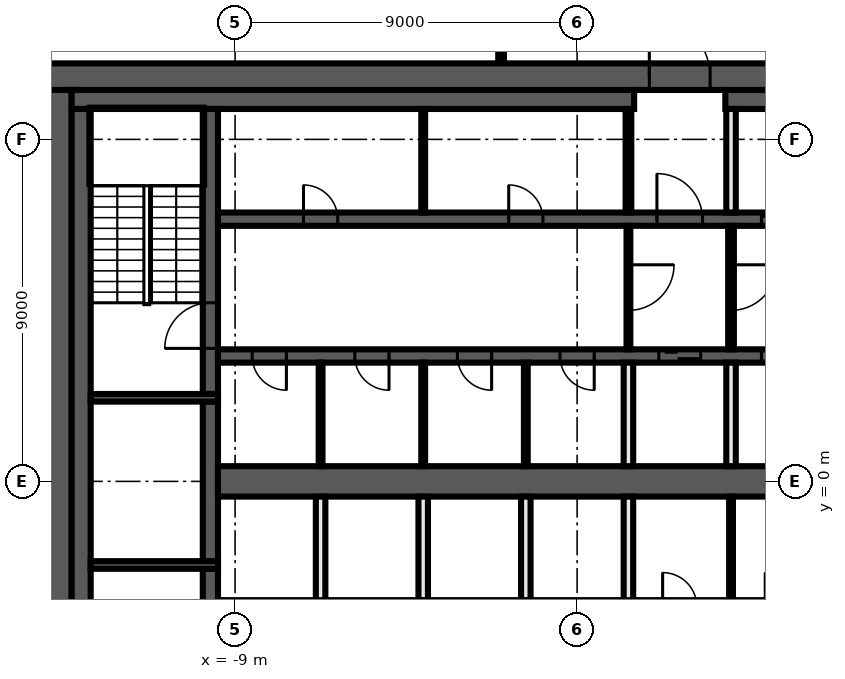
"""IFC4 building model, lengths in metres.
Left out: names, types, materials, properties, quantities, classifications, styles, units other than length and angle.
Written with IfcOpenShell. Run it as: python <this file> out.ifc"""

import sys

from ifc_helpers import new_model, si_unit, direction, frame, frame_2d, origin, place, context, subcontext, project, spatial, rectangle, extrude, element, fill, save


model = new_model("IFC4")
c1 = context("Model", 3, precision=1e-05, world=origin(), true_north=direction((0.0, 1.0)))
c2 = subcontext(c1, "Body", "Model", "MODEL_VIEW")
j1 = project(units=[si_unit("LENGTHUNIT", "METRE"), si_unit("PLANEANGLEUNIT", "RADIAN")], contexts=[c1])
p1 = place(None, origin())
s1 = spatial("IfcSite", under=j1, at=p1, CompositionType="ELEMENT")
p2 = place(p1, origin())
s2 = spatial("IfcBuilding", under=s1, at=p2, CompositionType="ELEMENT")
p3 = place(p2, frame((0.0, 0.0, 232.8)))
s3 = spatial("IfcBuildingStorey", under=s2, at=p3, CompositionType="ELEMENT", Elevation=232.8)
p4 = place(p3, frame((-2.0, 11.0, 0.0), z_axis=(0.0, 0.0, 1.0), x_axis=(0.0, 1.0, 0.0)))
e1 = element("IfcWall", 1, at=p4, inside=s3, PredefinedType="PARTITIONING", context=c2, shape_type="SweptSolid", body=[
    extrude(rectangle(XDim=2.325, YDim=0.15, at=frame_2d((1.163, 0.0))), origin(), (0.0, 0.0, 1.0), 3.75),
])
p5 = place(p3, frame((-14.0, 10.65, 0.0), z_axis=(0.0, 0.0, 1.0), x_axis=(1.0, 0.0, 0.0)))
e2 = element("IfcWall", 2, at=p5, inside=s3, PredefinedType="SHEAR", context=c2, shape_type="SweptSolid", body=[
    extrude(rectangle(XDim=28.0, YDim=0.7, at=frame_2d((14.0, 0.0))), origin(), (0.0, 0.0, 1.0), 3.75),
])
p6 = place(p5, frame((15.9, 0.0, 0.0)))
e3 = element("IfcOpeningElement", 3, at=p6, cuts=e2, PredefinedType="OPENING", context=c2, shape_type="SweptSolid", body=[
    extrude(rectangle(XDim=1.6, YDim=2.1, at=frame_2d((0.8, 1.05))), frame((0.0, 0.36, 0.0), z_axis=(0.0, -1.0, 0.0), x_axis=(1.0, 0.0, 0.0)), (0.0, 0.0, 1.0), 0.72),
])
p7 = place(p3, frame((-13.65, -10.3, 0.0), z_axis=(0.0, 0.0, 1.0), x_axis=(0.0, 1.0, 0.0)))
e4 = element("IfcWall", 4, at=p7, inside=s3, PredefinedType="SHEAR", context=c2, shape_type="SweptSolid", body=[
    extrude(rectangle(XDim=20.6, YDim=0.7, at=frame_2d((10.3, 0.0))), origin(), (0.0, 0.0, 1.0), 3.75),
])
p8 = place(p3, frame((-13.3, 10.05, 0.0), z_axis=(0.0, 0.0, 1.0), x_axis=(1.0, 0.0, 0.0)))
e5 = element("IfcWall", 5, at=p8, inside=s3, PredefinedType="SHEAR", context=c2, shape_type="SweptSolid", body=[
    extrude(rectangle(XDim=14.8, YDim=0.5, at=frame_2d((7.4, 0.0))), origin(), (0.0, 0.0, 1.0), 3.75),
])
p9 = place(p3, frame((3.9, 10.05, 0.0), z_axis=(0.0, 0.0, 1.0), x_axis=(1.0, 0.0, 0.0)))
e6 = element("IfcWall", 6, at=p9, inside=s3, PredefinedType="SHEAR", context=c2, shape_type="SweptSolid", body=[
    extrude(rectangle(XDim=9.4, YDim=0.5, at=frame_2d((4.7, 0.0))), origin(), (0.0, 0.0, 1.0), 3.75),
])
p10 = place(p3, frame((-13.05, -9.8, 0.0), z_axis=(0.0, 0.0, 1.0), x_axis=(0.0, 1.0, 0.0)))
e7 = element("IfcWall", 7, at=p10, inside=s3, PredefinedType="SHEAR", context=c2, shape_type="SweptSolid", body=[
    extrude(rectangle(XDim=19.6, YDim=0.5, at=frame_2d((9.8, 0.0))), origin(), (0.0, 0.0, 1.0), 3.75),
])
p11 = place(p3, frame((-9.65, -9.8, 0.0), z_axis=(0.0, 0.0, 1.0), x_axis=(0.0, 1.0, 0.0)))
e8 = element("IfcWall", 8, at=p11, inside=s3, PredefinedType="SHEAR", context=c2, shape_type="SweptSolid", body=[
    extrude(rectangle(XDim=7.5, YDim=0.4, at=frame_2d((3.75, 0.0))), origin(), (0.0, 0.0, 1.0), 3.75),
])
p12 = place(p11, frame((5.1, 0.0, 0.0)))
e9 = element("IfcOpeningElement", 9, at=p12, cuts=e8, PredefinedType="OPENING", context=c2, shape_type="SweptSolid", body=[
    extrude(rectangle(XDim=1.2, YDim=2.1, at=frame_2d((0.6, 1.05))), frame((0.0, 0.21, 0.0), z_axis=(0.0, -1.0, 0.0), x_axis=(1.0, 0.0, 0.0)), (0.0, 0.0, 1.0), 0.42),
])
p13 = place(p3, frame((-9.65, -2.1, 0.0), z_axis=(0.0, 0.0, 1.0), x_axis=(0.0, 1.0, 0.0)))
e10 = element("IfcWall", 10, at=p13, inside=s3, PredefinedType="SHEAR", context=c2, shape_type="SweptSolid", body=[
    extrude(rectangle(XDim=4.2, YDim=0.4, at=frame_2d((2.1, 0.0))), origin(), (0.0, 0.0, 1.0), 3.75),
])
p14 = place(p3, frame((-9.65, 2.3, 0.0), z_axis=(0.0, 0.0, 1.0), x_axis=(0.0, 1.0, 0.0)))
e11 = element("IfcWall", 11, at=p14, inside=s3, PredefinedType="SHEAR", context=c2, shape_type="SweptSolid", body=[
    extrude(rectangle(XDim=7.5, YDim=0.4, at=frame_2d((3.75, 0.0))), origin(), (0.0, 0.0, 1.0), 3.75),
])
p15 = place(p14, frame((1.2, 0.0, 0.0)))
e12 = element("IfcOpeningElement", 12, at=p15, cuts=e11, PredefinedType="OPENING", context=c2, shape_type="SweptSolid", body=[
    extrude(rectangle(XDim=1.2, YDim=2.1, at=frame_2d((0.6, 1.05))), frame((0.0, 0.21, 0.0), z_axis=(0.0, -1.0, 0.0), x_axis=(1.0, 0.0, 0.0)), (0.0, 0.0, 1.0), 0.42),
])
for number, where, z_axis, x_axis in (
    (13, (-9.45, 2.2, 0.0), (0.0, 0.0, 1.0), (-1.0, 0.0, 0.0)),
    (14, (-9.45, -2.2, 0.0), (0.0, 0.0, 1.0), (-1.0, 0.0, 0.0)),
):
    element("IfcWall", number, at=place(p3, frame(where, z_axis=z_axis, x_axis=x_axis)), inside=s3, PredefinedType="SHEAR", context=c2, shape_type="SweptSolid", body=[
        extrude(rectangle(XDim=3.35, YDim=0.2, at=frame_2d((1.675, 0.0))), origin(), (0.0, 0.0, 1.0), 3.75),
    ])
p16 = place(p3, frame((-9.45, 6.9, 0.0), z_axis=(0.0, 0.0, 1.0), x_axis=(1.0, 0.0, 0.0)))
e15 = element("IfcWall", 15, at=p16, inside=s3, PredefinedType="SHEAR", context=c2, shape_type="SweptSolid", body=[
    extrude(rectangle(XDim=18.9, YDim=0.35, at=frame_2d((9.45, 0.0))), origin(), (0.0, 0.0, 1.0), 3.75),
])
p17 = place(p16, frame((11.55, 0.0, 0.0)))
e16 = element("IfcOpeningElement", 16, at=p17, cuts=e15, PredefinedType="OPENING", context=c2, shape_type="SweptSolid", body=[
    extrude(rectangle(XDim=1.2, YDim=2.1, at=frame_2d((0.6, 1.05))), frame((0.0, 0.185, 0.0), z_axis=(0.0, -1.0, 0.0), x_axis=(1.0, 0.0, 0.0)), (0.0, 0.0, 1.0), 0.37),
])
p18 = place(p16, frame((14.3, 0.0, 0.0)))
e17 = element("IfcOpeningElement", 17, at=p18, cuts=e15, PredefinedType="OPENING", context=c2, shape_type="SweptSolid", body=[
    extrude(rectangle(XDim=1.1, YDim=2.1, at=frame_2d((0.55, 1.05))), frame((0.0, 0.185, 0.0), z_axis=(0.0, -1.0, 0.0), x_axis=(1.0, 0.0, 0.0)), (0.0, 0.0, 1.0), 0.37),
])
p19 = place(p16, frame((17.0, 0.0, 0.0)))
e18 = element("IfcOpeningElement", 18, at=p19, cuts=e15, PredefinedType="OPENING", context=c2, shape_type="SweptSolid", body=[
    extrude(rectangle(XDim=1.1, YDim=2.1, at=frame_2d((0.55, 1.05))), frame((0.0, 0.185, 0.0), z_axis=(0.0, -1.0, 0.0), x_axis=(1.0, 0.0, 0.0)), (0.0, 0.0, 1.0), 0.37),
])
p20 = place(p16, frame((2.25, 0.0, 0.0)))
e19 = element("IfcOpeningElement", 19, at=p20, cuts=e15, PredefinedType="OPENING", context=c2, shape_type="SweptSolid", body=[
    extrude(rectangle(XDim=0.9, YDim=2.1, at=frame_2d((0.45, 1.05))), frame((0.0, 0.185, 0.0), z_axis=(0.0, -1.0, 0.0), x_axis=(1.0, 0.0, 0.0)), (0.0, 0.0, 1.0), 0.37),
])
p21 = place(p16, frame((7.65, 0.0, 0.0)))
e20 = element("IfcOpeningElement", 20, at=p21, cuts=e15, PredefinedType="OPENING", context=c2, shape_type="SweptSolid", body=[
    extrude(rectangle(XDim=0.9, YDim=2.1, at=frame_2d((0.45, 1.05))), frame((0.0, 0.185, 0.0), z_axis=(0.0, -1.0, 0.0), x_axis=(1.0, 0.0, 0.0)), (0.0, 0.0, 1.0), 0.37),
])
p22 = place(p3, frame((9.45, 3.3, 0.0), z_axis=(0.0, 0.0, 1.0), x_axis=(-1.0, 0.0, 0.0)))
e21 = element("IfcWall", 21, at=p22, inside=s3, PredefinedType="SHEAR", context=c2, shape_type="SweptSolid", body=[
    extrude(rectangle(XDim=18.9, YDim=0.35, at=frame_2d((9.45, 0.0))), origin(), (0.0, 0.0, 1.0), 3.75),
])
p23 = place(p22, frame((6.2, 0.0, 0.0)))
e22 = element("IfcOpeningElement", 22, at=p23, cuts=e21, PredefinedType="OPENING", context=c2, shape_type="SweptSolid", body=[
    extrude(rectangle(XDim=1.1, YDim=2.1, at=frame_2d((0.55, 1.05))), frame((0.0, 0.185, 0.0), z_axis=(0.0, -1.0, 0.0), x_axis=(1.0, 0.0, 0.0)), (0.0, 0.0, 1.0), 0.37),
])
p24 = place(p22, frame((3.5, 0.0, 0.0)))
e23 = element("IfcOpeningElement", 23, at=p24, cuts=e21, PredefinedType="OPENING", context=c2, shape_type="SweptSolid", body=[
    extrude(rectangle(XDim=1.1, YDim=2.1, at=frame_2d((0.55, 1.05))), frame((0.0, 0.185, 0.0), z_axis=(0.0, -1.0, 0.0), x_axis=(1.0, 0.0, 0.0)), (0.0, 0.0, 1.0), 0.37),
])
p25 = place(p22, frame((0.9, 0.0, 0.0)))
e24 = element("IfcOpeningElement", 24, at=p25, cuts=e21, PredefinedType="OPENING", context=c2, shape_type="SweptSolid", body=[
    extrude(rectangle(XDim=0.9, YDim=2.1, at=frame_2d((0.45, 1.05))), frame((0.0, 0.185, 0.0), z_axis=(0.0, -1.0, 0.0), x_axis=(1.0, 0.0, 0.0)), (0.0, 0.0, 1.0), 0.37),
])
p26 = place(p22, frame((17.1, 0.0, 0.0)))
e25 = element("IfcOpeningElement", 25, at=p26, cuts=e21, PredefinedType="OPENING", context=c2, shape_type="SweptSolid", body=[
    extrude(rectangle(XDim=0.9, YDim=2.1, at=frame_2d((0.45, 1.05))), frame((0.0, 0.185, 0.0), z_axis=(0.0, -1.0, 0.0), x_axis=(1.0, 0.0, 0.0)), (0.0, 0.0, 1.0), 0.37),
])
p27 = place(p22, frame((14.4, 0.0, 0.0)))
e26 = element("IfcOpeningElement", 26, at=p27, cuts=e21, PredefinedType="OPENING", context=c2, shape_type="SweptSolid", body=[
    extrude(rectangle(XDim=0.9, YDim=2.1, at=frame_2d((0.45, 1.05))), frame((0.0, 0.185, 0.0), z_axis=(0.0, -1.0, 0.0), x_axis=(1.0, 0.0, 0.0)), (0.0, 0.0, 1.0), 0.37),
])
p28 = place(p22, frame((11.7, 0.0, 0.0)))
e27 = element("IfcOpeningElement", 27, at=p28, cuts=e21, PredefinedType="OPENING", context=c2, shape_type="SweptSolid", body=[
    extrude(rectangle(XDim=0.9, YDim=2.1, at=frame_2d((0.45, 1.05))), frame((0.0, 0.185, 0.0), z_axis=(0.0, -1.0, 0.0), x_axis=(1.0, 0.0, 0.0)), (0.0, 0.0, 1.0), 0.37),
])
p29 = place(p22, frame((9.0, 0.0, 0.0)))
e28 = element("IfcOpeningElement", 28, at=p29, cuts=e21, PredefinedType="OPENING", context=c2, shape_type="SweptSolid", body=[
    extrude(rectangle(XDim=0.9, YDim=2.1, at=frame_2d((0.45, 1.05))), frame((0.0, 0.185, 0.0), z_axis=(0.0, -1.0, 0.0), x_axis=(1.0, 0.0, 0.0)), (0.0, 0.0, 1.0), 0.37),
])
p30 = place(p3, frame((-9.45, 0.0, 0.0), z_axis=(0.0, 0.0, 1.0), x_axis=(1.0, 0.0, 0.0)))
e29 = element("IfcWall", 29, at=p30, inside=s3, PredefinedType="SHEAR", context=c2, shape_type="SweptSolid", body=[
    extrude(rectangle(XDim=18.9, YDim=0.8, at=frame_2d((9.45, 0.0))), origin(), (0.0, 0.0, 1.0), 3.75),
])
p31 = place(p3, frame((4.05, 6.725, 0.0), z_axis=(0.0, 0.0, 1.0), x_axis=(0.0, -1.0, 0.0)))
e30 = element("IfcWall", 30, at=p31, inside=s3, PredefinedType="PARTITIONING", context=c2, shape_type="SweptSolid", body=[
    extrude(rectangle(XDim=3.25, YDim=0.15, at=frame_2d((1.625, 0.0))), origin(), (0.0, 0.0, 1.0), 3.75),
])
p32 = place(p31, frame((1.025, 0.0, 0.0)))
e31 = element("IfcOpeningElement", 31, at=p32, cuts=e30, PredefinedType="OPENING", context=c2, shape_type="SweptSolid", body=[
    extrude(rectangle(XDim=1.2, YDim=2.1, at=frame_2d((0.6, 1.05))), frame((0.0, 0.085, 0.0), z_axis=(0.0, -1.0, 0.0), x_axis=(1.0, 0.0, 0.0)), (0.0, 0.0, 1.0), 0.17),
])
p33 = place(p3, frame((4.05, -3.125, 0.0), z_axis=(0.0, 0.0, 1.0), x_axis=(0.0, 1.0, 0.0)))
e32 = element("IfcWall", 32, at=p33, inside=s3, PredefinedType="PARTITIONING", context=c2, shape_type="SweptSolid", body=[
    extrude(rectangle(XDim=2.725, YDim=0.1, at=frame_2d((1.363, 0.0))), origin(), (0.0, 0.0, 1.0), 3.75),
])
for number, where, z_axis, x_axis in (
    (33, (4.05, 0.4, 0.0), (0.0, 0.0, 1.0), (0.0, 1.0, 0.0)),
    (34, (4.05, 7.075, 0.0), (0.0, 0.0, 1.0), (0.0, 1.0, 0.0)),
):
    element("IfcWall", number, at=place(p3, frame(where, z_axis=z_axis, x_axis=x_axis)), inside=s3, PredefinedType="SOLIDWALL", context=c2, shape_type="SweptSolid", body=[
        extrude(rectangle(XDim=2.725, YDim=0.25, at=frame_2d((1.363, 0.0))), origin(), (0.0, 0.0, 1.0), 3.75),
    ])
p34 = place(p3, frame((1.35, 7.075, 0.0), z_axis=(0.0, 0.0, 1.0), x_axis=(0.0, 1.0, 0.0)))
e35 = element("IfcWall", 35, at=p34, inside=s3, PredefinedType="PARTITIONING", context=c2, shape_type="SweptSolid", body=[
    extrude(rectangle(XDim=2.725, YDim=0.15, at=frame_2d((1.363, 0.0))), origin(), (0.0, 0.0, 1.0), 3.75),
])
p35 = place(p3, frame((1.35, 6.725, 0.0), z_axis=(0.0, 0.0, 1.0), x_axis=(0.0, -1.0, 0.0)))
e36 = element("IfcWall", 36, at=p35, inside=s3, PredefinedType="PARTITIONING", context=c2, shape_type="SweptSolid", body=[
    extrude(rectangle(XDim=3.25, YDim=0.1, at=frame_2d((1.625, 0.0))), origin(), (0.0, 0.0, 1.0), 3.75),
])
p36 = place(p35, frame((1.025, 0.0, 0.0)))
e37 = element("IfcOpeningElement", 37, at=p36, cuts=e36, PredefinedType="OPENING", context=c2, shape_type="SweptSolid", body=[
    extrude(rectangle(XDim=1.2, YDim=2.1, at=frame_2d((0.6, 1.05))), frame((0.0, 0.06, 0.0), z_axis=(0.0, -1.0, 0.0), x_axis=(1.0, 0.0, 0.0)), (0.0, 0.0, 1.0), 0.12),
])
for number, where, z_axis, x_axis in (
    (38, (1.35, -3.125, 0.0), (0.0, 0.0, 1.0), (0.0, 1.0, 0.0)),
    (39, (1.35, 0.4, 0.0), (0.0, 0.0, 1.0), (0.0, 1.0, 0.0)),
):
    element("IfcWall", number, at=place(p3, frame(where, z_axis=z_axis, x_axis=x_axis)), inside=s3, PredefinedType="SOLIDWALL", context=c2, shape_type="SweptSolid", body=[
        extrude(rectangle(XDim=2.725, YDim=0.25, at=frame_2d((1.363, 0.0))), origin(), (0.0, 0.0, 1.0), 3.75),
    ])
p37 = place(p3, frame((-1.35, 0.4, 0.0), z_axis=(0.0, 0.0, 1.0), x_axis=(0.0, 1.0, 0.0)))
e40 = element("IfcWall", 40, at=p37, inside=s3, PredefinedType="PARTITIONING", context=c2, shape_type="SweptSolid", body=[
    extrude(rectangle(XDim=2.725, YDim=0.1, at=frame_2d((1.363, 0.0))), origin(), (0.0, 0.0, 1.0), 3.75),
])
p38 = place(p3, frame((-1.35, -3.125, 0.0), z_axis=(0.0, 0.0, 1.0), x_axis=(0.0, 1.0, 0.0)))
e41 = element("IfcWall", 41, at=p38, inside=s3, PredefinedType="SOLIDWALL", context=c2, shape_type="SweptSolid", body=[
    extrude(rectangle(XDim=2.725, YDim=0.25, at=frame_2d((1.363, 0.0))), origin(), (0.0, 0.0, 1.0), 3.75),
])
for number, where, z_axis, x_axis in (
    (42, (-4.05, 0.4, 0.0), (0.0, 0.0, 1.0), (0.0, 1.0, 0.0)),
    (43, (-4.05, 7.075, 0.0), (0.0, 0.0, 1.0), (0.0, 1.0, 0.0)),
):
    element("IfcWall", number, at=place(p3, frame(where, z_axis=z_axis, x_axis=x_axis)), inside=s3, PredefinedType="PARTITIONING", context=c2, shape_type="SweptSolid", body=[
        extrude(rectangle(XDim=2.725, YDim=0.1, at=frame_2d((1.363, 0.0))), origin(), (0.0, 0.0, 1.0), 3.75),
    ])
p39 = place(p3, frame((-4.05, -3.125, 0.0), z_axis=(0.0, 0.0, 1.0), x_axis=(0.0, 1.0, 0.0)))
e44 = element("IfcWall", 44, at=p39, inside=s3, PredefinedType="SOLIDWALL", context=c2, shape_type="SweptSolid", body=[
    extrude(rectangle(XDim=2.725, YDim=0.25, at=frame_2d((1.363, 0.0))), origin(), (0.0, 0.0, 1.0), 3.75),
])
p40 = place(p3, frame((-6.75, 0.4, 0.0), z_axis=(0.0, 0.0, 1.0), x_axis=(0.0, 1.0, 0.0)))
e45 = element("IfcWall", 45, at=p40, inside=s3, PredefinedType="PARTITIONING", context=c2, shape_type="SweptSolid", body=[
    extrude(rectangle(XDim=2.725, YDim=0.1, at=frame_2d((1.363, 0.0))), origin(), (0.0, 0.0, 1.0), 3.75),
])
p41 = place(p3, frame((-6.75, -3.125, 0.0), z_axis=(0.0, 0.0, 1.0), x_axis=(0.0, 1.0, 0.0)))
e46 = element("IfcWall", 46, at=p41, inside=s3, PredefinedType="SOLIDWALL", context=c2, shape_type="SweptSolid", body=[
    extrude(rectangle(XDim=2.725, YDim=0.25, at=frame_2d((1.363, 0.0))), origin(), (0.0, 0.0, 1.0), 3.75),
])
p42 = place(p6, origin())
e47 = element("IfcDoor", 47, at=p42, inside=s3, OperationType="DOUBLE_DOOR_SINGLE_SWING", PredefinedType="DOOR", context=c2, shape_type="SweptSolid", body=[
    extrude(rectangle(XDim=1.6, YDim=2.1, at=frame_2d((0.8, 1.05))), frame((0.0, 0.025, 0.0), z_axis=(0.0, -1.0, 0.0), x_axis=(1.0, 0.0, 0.0)), (0.0, 0.0, 1.0), 0.05),
])
fill(e3, e47)
p43 = place(p17, origin())
e48 = element("IfcDoor", 48, at=p43, inside=s3, OperationType="SINGLE_SWING_LEFT", PredefinedType="DOOR", context=c2, shape_type="SweptSolid", body=[
    extrude(rectangle(XDim=1.2, YDim=2.1, at=frame_2d((0.6, 1.05))), frame((0.0, 0.025, 0.0), z_axis=(0.0, -1.0, 0.0), x_axis=(1.0, 0.0, 0.0)), (0.0, 0.0, 1.0), 0.05),
])
fill(e16, e48)
p44 = place(p18, origin())
e49 = element("IfcDoor", 49, at=p44, inside=s3, OperationType="DOUBLE_DOOR_SLIDING", PredefinedType="DOOR", context=c2, shape_type="SweptSolid", body=[
    extrude(rectangle(XDim=1.1, YDim=2.1, at=frame_2d((0.55, 1.05))), frame((0.0, 0.025, 0.0), z_axis=(0.0, -1.0, 0.0), x_axis=(1.0, 0.0, 0.0)), (0.0, 0.0, 1.0), 0.05),
])
fill(e17, e49)
p45 = place(p23, origin())
e50 = element("IfcDoor", 50, at=p45, inside=s3, OperationType="DOUBLE_DOOR_SLIDING", PredefinedType="DOOR", context=c2, shape_type="SweptSolid", body=[
    extrude(rectangle(XDim=1.1, YDim=2.1, at=frame_2d((0.55, 1.05))), frame((0.0, 0.025, 0.0), z_axis=(0.0, -1.0, 0.0), x_axis=(1.0, 0.0, 0.0)), (0.0, 0.0, 1.0), 0.05),
])
fill(e22, e50)
p46 = place(p24, origin())
e51 = element("IfcDoor", 51, at=p46, inside=s3, OperationType="DOUBLE_DOOR_SLIDING", PredefinedType="DOOR", context=c2, shape_type="SweptSolid", body=[
    extrude(rectangle(XDim=1.1, YDim=2.1, at=frame_2d((0.55, 1.05))), frame((0.0, 0.025, 0.0), z_axis=(0.0, -1.0, 0.0), x_axis=(1.0, 0.0, 0.0)), (0.0, 0.0, 1.0), 0.05),
])
fill(e23, e51)
p47 = place(p20, origin())
e52 = element("IfcDoor", 52, at=p47, inside=s3, OperationType="SINGLE_SWING_RIGHT", PredefinedType="DOOR", context=c2, shape_type="SweptSolid", body=[
    extrude(rectangle(XDim=0.9, YDim=2.1, at=frame_2d((0.45, 1.05))), frame((0.0, 0.025, 0.0), z_axis=(0.0, -1.0, 0.0), x_axis=(1.0, 0.0, 0.0)), (0.0, 0.0, 1.0), 0.05),
])
fill(e19, e52)
p48 = place(p21, origin())
e53 = element("IfcDoor", 53, at=p48, inside=s3, OperationType="SINGLE_SWING_LEFT", PredefinedType="DOOR", context=c2, shape_type="SweptSolid", body=[
    extrude(rectangle(XDim=0.9, YDim=2.1, at=frame_2d((0.45, 1.05))), frame((0.0, 0.025, 0.0), z_axis=(0.0, -1.0, 0.0), x_axis=(1.0, 0.0, 0.0)), (0.0, 0.0, 1.0), 0.05),
])
fill(e20, e53)
p49 = place(p26, origin())
e54 = element("IfcDoor", 54, at=p49, inside=s3, OperationType="SINGLE_SWING_RIGHT", PredefinedType="DOOR", context=c2, shape_type="SweptSolid", body=[
    extrude(rectangle(XDim=0.9, YDim=2.1, at=frame_2d((0.45, 1.05))), frame((0.0, 0.025, 0.0), z_axis=(0.0, -1.0, 0.0), x_axis=(1.0, 0.0, 0.0)), (0.0, 0.0, 1.0), 0.05),
])
fill(e25, e54)
p50 = place(p27, origin())
e55 = element("IfcDoor", 55, at=p50, inside=s3, OperationType="SINGLE_SWING_LEFT", PredefinedType="DOOR", context=c2, shape_type="SweptSolid", body=[
    extrude(rectangle(XDim=0.9, YDim=2.1, at=frame_2d((0.45, 1.05))), frame((0.0, 0.025, 0.0), z_axis=(0.0, -1.0, 0.0), x_axis=(1.0, 0.0, 0.0)), (0.0, 0.0, 1.0), 0.05),
])
fill(e26, e55)
p51 = place(p28, origin())
e56 = element("IfcDoor", 56, at=p51, inside=s3, OperationType="SINGLE_SWING_RIGHT", PredefinedType="DOOR", context=c2, shape_type="SweptSolid", body=[
    extrude(rectangle(XDim=0.9, YDim=2.1, at=frame_2d((0.45, 1.05))), frame((0.0, 0.025, 0.0), z_axis=(0.0, -1.0, 0.0), x_axis=(1.0, 0.0, 0.0)), (0.0, 0.0, 1.0), 0.05),
])
fill(e27, e56)
p52 = place(p29, origin())
e57 = element("IfcDoor", 57, at=p52, inside=s3, OperationType="SINGLE_SWING_LEFT", PredefinedType="DOOR", context=c2, shape_type="SweptSolid", body=[
    extrude(rectangle(XDim=0.9, YDim=2.1, at=frame_2d((0.45, 1.05))), frame((0.0, 0.025, 0.0), z_axis=(0.0, -1.0, 0.0), x_axis=(1.0, 0.0, 0.0)), (0.0, 0.0, 1.0), 0.05),
])
fill(e28, e57)
p53 = place(p15, origin())
e58 = element("IfcDoor", 58, at=p53, inside=s3, OperationType="SINGLE_SWING_RIGHT", PredefinedType="DOOR", context=c2, shape_type="SweptSolid", body=[
    extrude(rectangle(XDim=1.2, YDim=2.1, at=frame_2d((0.6, 1.05))), frame((0.0, 0.025, 0.0), z_axis=(0.0, -1.0, 0.0), x_axis=(1.0, 0.0, 0.0)), (0.0, 0.0, 1.0), 0.05),
])
fill(e12, e58)
p54 = place(p36, origin())
e59 = element("IfcDoor", 59, at=p54, inside=s3, OperationType="SINGLE_SWING_LEFT", PredefinedType="DOOR", context=c2, shape_type="SweptSolid", body=[
    extrude(rectangle(XDim=1.2, YDim=2.1, at=frame_2d((0.6, 1.05))), frame((0.0, 0.025, 0.0), z_axis=(0.0, -1.0, 0.0), x_axis=(1.0, 0.0, 0.0)), (0.0, 0.0, 1.0), 0.05),
])
fill(e37, e59)
p55 = place(p32, origin())
e60 = element("IfcDoor", 60, at=p55, inside=s3, OperationType="SINGLE_SWING_RIGHT", PredefinedType="DOOR", context=c2, shape_type="SweptSolid", body=[
    extrude(rectangle(XDim=1.2, YDim=2.1, at=frame_2d((0.6, 1.05))), frame((0.0, 0.025, 0.0), z_axis=(0.0, -1.0, 0.0), x_axis=(1.0, 0.0, 0.0)), (0.0, 0.0, 1.0), 0.05),
])
fill(e31, e60)
save(model, sys.argv[1])
